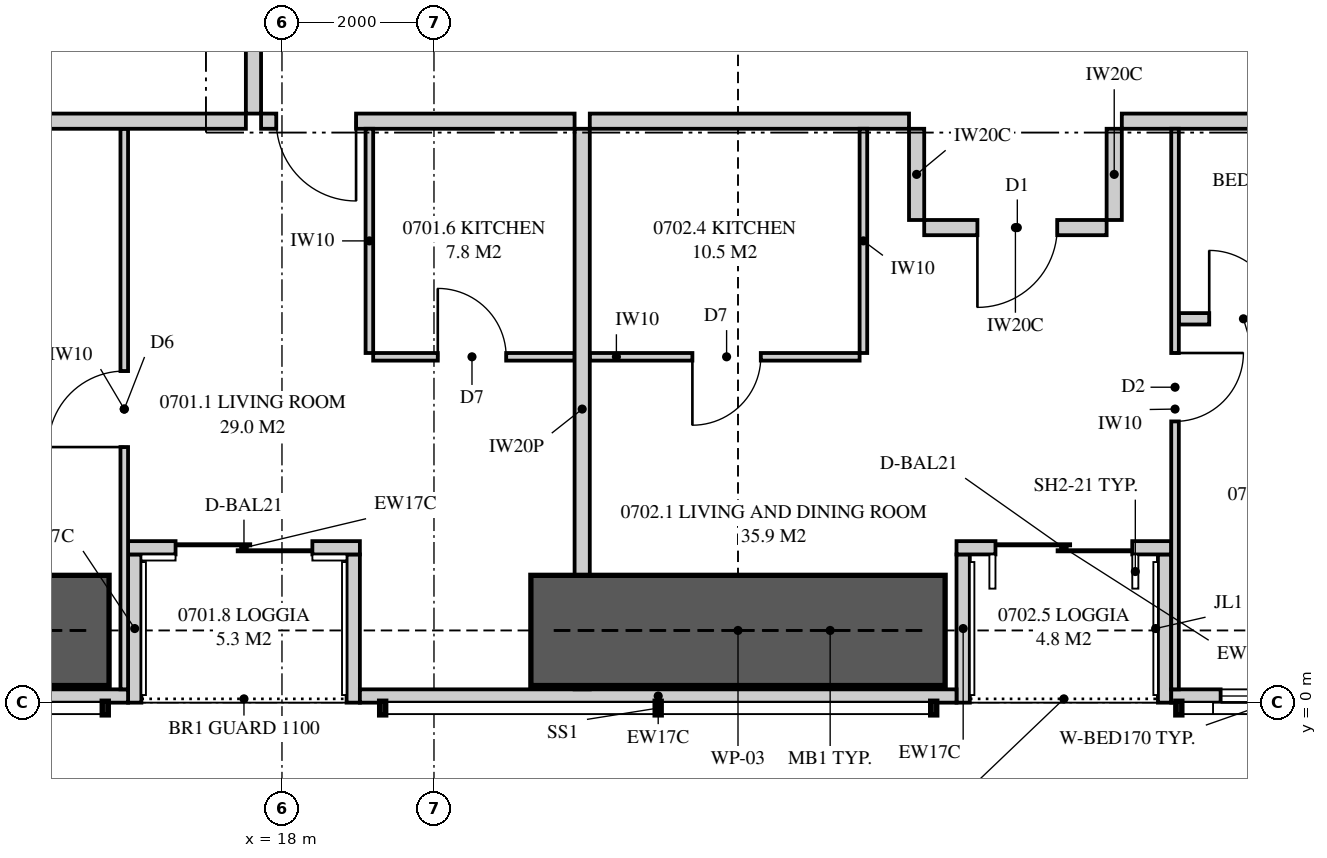
"""IFC4 building model, lengths in metres.
Left out: names, types, materials, properties, quantities, classifications, styles, units other than length and angle.
Written with IfcOpenShell. Run it as: python <this file> out.ifc"""

import sys

from ifc_helpers import new_model, si_unit, direction, frame, frame_2d, origin, place, context, subcontext, project, spatial, polyline, rectangle, outline, extrude, element, fill, save


model = new_model("IFC4")
c1 = context("Model", 3, precision=1e-05, world=origin(), true_north=direction((0.0, 1.0)))
c2 = subcontext(c1, "Body", "Model", "MODEL_VIEW")
j1 = project(units=[si_unit("LENGTHUNIT", "METRE"), si_unit("PLANEANGLEUNIT", "RADIAN")], contexts=[c1])
p1 = place(None, origin())
s1 = spatial("IfcSite", under=j1, at=p1, CompositionType="ELEMENT")
p2 = place(p1, origin())
s2 = spatial("IfcBuilding", under=s1, at=p2, CompositionType="ELEMENT")
p3 = place(p2, frame((0.0, 0.0, 31.05)))
s3 = spatial("IfcBuildingStorey", under=s2, at=p3, CompositionType="ELEMENT", Elevation=31.05)
p4 = place(p3, frame((5.051, 0.087, 0.0), z_axis=(0.0, 0.0, 1.0), x_axis=(1.0, 0.0, 0.0)))
e1 = element("IfcWall", 1, at=p4, inside=s3, PredefinedType="SOLIDWALL", context=c2, shape_type="SweptSolid", body=[
    extrude(outline(polyline([(0.0, 0.0), (10.924, 0.0), (10.924, 2.15), (7.949, 2.15), (7.949, 3.11), (7.793, 3.11), (7.793, 2.15), (7.745, 2.15), (7.745, 3.11), (0.0, 3.11), (0.0, 0.0)])), frame((0.0, 0.087, 0.0), z_axis=(0.0, -1.0, 0.0), x_axis=(1.0, 0.0, 0.0)), (0.0, 0.0, 1.0), 0.175),
])
p5 = place(p4, frame((2.199, 0.0, 0.4)))
e2 = element("IfcOpeningElement", 2, at=p5, cuts=e1, PredefinedType="OPENING", context=c2, shape_type="SweptSolid", body=[
    extrude(rectangle(XDim=1.8, YDim=1.7, at=frame_2d((0.9, 0.85))), frame((0.0, 0.097, 0.0), z_axis=(0.0, -1.0, 0.0), x_axis=(1.0, 0.0, 0.0)), (0.0, 0.0, 1.0), 0.195),
])
p6 = place(p3, frame((19.025, 0.087, 0.0), z_axis=(0.0, 0.0, 1.0), x_axis=(1.0, 0.0, 0.0)))
e3 = element("IfcWall", 3, at=p6, inside=s3, PredefinedType="SOLIDWALL", context=c2, shape_type="SweptSolid", body=[
    extrude(rectangle(XDim=7.85, YDim=0.175, at=frame_2d((3.925, 0.0))), origin(), (0.0, 0.0, 1.0), 2.15),
])
p7 = place(p3, frame((29.7, 0.087, 0.0), z_axis=(0.0, 0.0, 1.0), x_axis=(1.0, 0.0, 0.0)))
e4 = element("IfcWall", 4, at=p7, inside=s3, PredefinedType="SOLIDWALL", context=c2, shape_type="SweptSolid", body=[
    extrude(outline(polyline([(0.0, 0.0), (8.075, 0.0), (8.075, 3.11), (5.504, 3.11), (5.504, 2.15), (5.456, 2.15), (5.456, 3.11), (5.3, 3.11), (5.3, 2.15), (0.0, 2.15), (0.0, 0.0)])), frame((0.0, 0.087, 0.0), z_axis=(0.0, -1.0, 0.0), x_axis=(1.0, 0.0, 0.0)), (0.0, 0.0, 1.0), 0.175),
])
p8 = place(p7, frame((0.65, 0.0, 0.4)))
e5 = element("IfcOpeningElement", 5, at=p8, cuts=e4, PredefinedType="OPENING", context=c2, shape_type="SweptSolid", body=[
    extrude(rectangle(XDim=1.8, YDim=1.7, at=frame_2d((0.9, 0.85))), frame((0.0, 0.097, 0.0), z_axis=(0.0, -1.0, 0.0), x_axis=(1.0, 0.0, 0.0)), (0.0, 0.0, 1.0), 0.195),
])
p9 = place(p3, frame((15.975, 2.038, 0.0), z_axis=(0.0, 0.0, 1.0), x_axis=(1.0, 0.0, 0.0)))
e6 = element("IfcWall", 6, at=p9, inside=s3, PredefinedType="SOLIDWALL", context=c2, shape_type="SweptSolid", body=[
    extrude(rectangle(XDim=3.05, YDim=0.175, at=frame_2d((1.525, 0.0))), origin(), (0.0, 0.0, 1.0), 3.11),
])
p10 = place(p9, frame((0.625, 0.0, 0.0)))
e7 = element("IfcOpeningElement", 7, at=p10, cuts=e6, PredefinedType="OPENING", context=c2, shape_type="SweptSolid", body=[
    extrude(rectangle(XDim=1.8, YDim=2.1, at=frame_2d((0.9, 1.05))), frame((0.0, 0.097, 0.0), z_axis=(0.0, -1.0, 0.0), x_axis=(1.0, 0.0, 0.0)), (0.0, 0.0, 1.0), 0.195),
])
for number, where, z_axis, x_axis in (
    (8, (16.062, 0.0, 0.0), (0.0, 0.0, 1.0), (0.0, 1.0, 0.0)),
    (9, (18.938, 0.0, 0.0), (0.0, 0.0, 1.0), (0.0, 1.0, 0.0)),
):
    element("IfcWall", number, at=place(p3, frame(where, z_axis=z_axis, x_axis=x_axis)), inside=s3, PredefinedType="SOLIDWALL", context=c2, shape_type="SweptSolid", body=[
        extrude(outline(polyline([(0.0, 0.0), (1.95, 0.0), (1.95, 3.11), (1.75, 3.11), (1.75, 2.15), (0.15, 2.15), (0.15, 3.11), (0.0, 3.11), (0.0, 0.0)])), frame((0.0, 0.087, 0.0), z_axis=(0.0, -1.0, 0.0), x_axis=(1.0, 0.0, 0.0)), (0.0, 0.0, 1.0), 0.175),
    ])
p11 = place(p3, frame((26.875, 2.038, 0.0), z_axis=(0.0, 0.0, 1.0), x_axis=(1.0, 0.0, 0.0)))
e10 = element("IfcWall", 10, at=p11, inside=s3, PredefinedType="SOLIDWALL", context=c2, shape_type="SweptSolid", body=[
    extrude(rectangle(XDim=2.825, YDim=0.175, at=frame_2d((1.413, 0.0))), origin(), (0.0, 0.0, 1.0), 3.11),
])
p12 = place(p11, frame((0.512, 0.0, 0.0)))
e11 = element("IfcOpeningElement", 11, at=p12, cuts=e10, PredefinedType="OPENING", context=c2, shape_type="SweptSolid", body=[
    extrude(rectangle(XDim=1.8, YDim=2.1, at=frame_2d((0.9, 1.05))), frame((0.0, 0.097, 0.0), z_axis=(0.0, -1.0, 0.0), x_axis=(1.0, 0.0, 0.0)), (0.0, 0.0, 1.0), 0.195),
])
for number, where, z_axis, x_axis in (
    (12, (26.962, 0.0, 0.0), (0.0, 0.0, 1.0), (0.0, 1.0, 0.0)),
    (13, (29.613, 0.0, 0.0), (0.0, 0.0, 1.0), (0.0, 1.0, 0.0)),
):
    element("IfcWall", number, at=place(p3, frame(where, z_axis=z_axis, x_axis=x_axis)), inside=s3, PredefinedType="SOLIDWALL", context=c2, shape_type="SweptSolid", body=[
        extrude(outline(polyline([(0.0, 0.0), (1.95, 0.0), (1.95, 3.11), (1.75, 3.11), (1.75, 2.15), (0.15, 2.15), (0.15, 3.11), (0.0, 3.11), (0.0, 0.0)])), frame((0.0, 0.087, 0.0), z_axis=(0.0, -1.0, 0.0), x_axis=(1.0, 0.0, 0.0)), (0.0, 0.0, 1.0), 0.175),
    ])
p13 = place(p3, frame((21.95, 0.175, 0.0), z_axis=(0.0, 0.0, 1.0), x_axis=(0.0, 1.0, 0.0)))
e14 = element("IfcWall", 14, at=p13, inside=s3, PredefinedType="PARTITIONING", context=c2, shape_type="SweptSolid", body=[
    extrude(outline(polyline([(0.529, 2.15), (0.0, 2.15), (0.0, 0.0), (0.529, 0.0), (0.529, 0.09), (1.021, 0.09), (1.021, 0.0), (7.375, 0.0), (7.375, 3.11), (1.685, 3.11), (1.685, 2.15), (1.021, 2.15), (1.021, 2.06), (0.529, 2.06), (0.529, 2.15)])), frame((0.0, 0.1, 0.0), z_axis=(0.0, -1.0, 0.0), x_axis=(1.0, 0.0, 0.0)), (0.0, 0.0, 1.0), 0.2),
])
p14 = place(p3, frame((17.725, 7.65, 0.0), z_axis=(0.0, 0.0, 1.0), x_axis=(1.0, 0.0, 0.0)))
e15 = element("IfcWall", 15, at=p14, inside=s3, PredefinedType="PARTITIONING", context=c2, shape_type="SweptSolid", body=[
    extrude(rectangle(XDim=4.125, YDim=0.2, at=frame_2d((2.062, 0.0))), origin(), (0.0, 0.0, 1.0), 3.11),
])
p15 = place(p14, frame((0.2, 0.0, 0.0)))
e16 = element("IfcOpeningElement", 16, at=p15, cuts=e15, PredefinedType="OPENING", context=c2, shape_type="SweptSolid", body=[
    extrude(rectangle(XDim=1.05, YDim=2.2, at=frame_2d((0.525, 1.1))), frame((0.0, 0.11, 0.0), z_axis=(0.0, -1.0, 0.0), x_axis=(1.0, 0.0, 0.0)), (0.0, 0.0, 1.0), 0.22),
])
p16 = place(p3, frame((19.2, 4.55, 0.0), z_axis=(0.0, 0.0, 1.0), x_axis=(1.0, 0.0, 0.0)))
e17 = element("IfcWall", 17, at=p16, inside=s3, PredefinedType="PARTITIONING", context=c2, shape_type="SweptSolid", body=[
    extrude(rectangle(XDim=2.65, YDim=0.1, at=frame_2d((1.325, 0.0))), origin(), (0.0, 0.0, 1.0), 3.11),
])
p17 = place(p16, frame((0.85, 0.0, 0.0)))
e18 = element("IfcOpeningElement", 18, at=p17, cuts=e17, PredefinedType="OPENING", context=c2, shape_type="SweptSolid", body=[
    extrude(rectangle(XDim=0.9, YDim=2.1, at=frame_2d((0.45, 1.05))), frame((0.0, 0.06, 0.0), z_axis=(0.0, -1.0, 0.0), x_axis=(1.0, 0.0, 0.0)), (0.0, 0.0, 1.0), 0.12),
])
p18 = place(p3, frame((19.15, 4.6, 0.0), z_axis=(0.0, 0.0, 1.0), x_axis=(0.0, 1.0, 0.0)))
e19 = element("IfcWall", 19, at=p18, inside=s3, PredefinedType="PARTITIONING", context=c2, shape_type="SweptSolid", body=[
    extrude(rectangle(XDim=2.95, YDim=0.1, at=frame_2d((1.475, 0.0))), origin(), (0.0, 0.0, 1.0), 3.11),
])
p19 = place(p3, frame((15.925, 0.175, 0.0), z_axis=(0.0, 0.0, 1.0), x_axis=(0.0, 1.0, 0.0)))
e20 = element("IfcWall", 20, at=p19, inside=s3, PredefinedType="PARTITIONING", context=c2, shape_type="SweptSolid", body=[
    extrude(outline(polyline([(0.0, 0.0), (7.375, 0.0), (7.375, 3.11), (1.635, 3.11), (1.635, 2.15), (0.0, 2.15), (0.0, 3.11), (0.0, 0.0)])), frame((0.0, 0.05, 0.0), z_axis=(0.0, -1.0, 0.0), x_axis=(1.0, 0.0, 0.0)), (0.0, 0.0, 1.0), 0.1),
])
p20 = place(p19, frame((3.188, 0.0, 0.0)))
e21 = element("IfcOpeningElement", 21, at=p20, cuts=e20, PredefinedType="OPENING", context=c2, shape_type="SweptSolid", body=[
    extrude(rectangle(XDim=1.0, YDim=2.1, at=frame_2d((0.5, 1.05))), frame((0.0, 0.06, 0.0), z_axis=(0.0, -1.0, 0.0), x_axis=(1.0, 0.0, 0.0)), (0.0, 0.0, 1.0), 0.12),
])
p21 = place(p3, frame((22.05, 7.65, 0.0), z_axis=(0.0, 0.0, 1.0), x_axis=(1.0, 0.0, 0.0)))
e22 = element("IfcWall", 22, at=p21, inside=s3, PredefinedType="PARTITIONING", context=c2, shape_type="SweptSolid", body=[
    extrude(outline(polyline([(0.0, 0.0), (4.2, 0.0), (4.2, 3.11), (2.287, 3.11), (2.287, 2.541), (1.613, 2.541), (1.613, 3.11), (0.0, 3.11), (0.0, 0.0)])), frame((0.0, 0.1, 0.0), z_axis=(0.0, -1.0, 0.0), x_axis=(1.0, 0.0, 0.0)), (0.0, 0.0, 1.0), 0.2),
])
p22 = place(p3, frame((29.75, 0.175, 0.0), z_axis=(0.0, 0.0, 1.0), x_axis=(0.0, 1.0, 0.0)))
e23 = element("IfcWall", 23, at=p22, inside=s3, PredefinedType="PARTITIONING", context=c2, shape_type="SweptSolid", body=[
    extrude(outline(polyline([(0.0, 0.0), (7.375, 0.0), (7.375, 3.11), (1.635, 3.11), (1.635, 2.15), (0.0, 2.15), (0.0, 3.11), (0.0, 0.0)])), frame((0.0, 0.05, 0.0), z_axis=(0.0, -1.0, 0.0), x_axis=(1.0, 0.0, 0.0)), (0.0, 0.0, 1.0), 0.1),
])
p23 = place(p22, frame((3.525, 0.0, 0.0)))
e24 = element("IfcOpeningElement", 24, at=p23, cuts=e23, PredefinedType="OPENING", context=c2, shape_type="SweptSolid", body=[
    extrude(rectangle(XDim=0.9, YDim=2.1, at=frame_2d((0.45, 1.05))), frame((0.0, 0.06, 0.0), z_axis=(0.0, -1.0, 0.0), x_axis=(1.0, 0.0, 0.0)), (0.0, 0.0, 1.0), 0.12),
])
p24 = place(p3, frame((29.8, 5.05, 0.0), z_axis=(0.0, 0.0, 1.0), x_axis=(1.0, 0.0, 0.0)))
e25 = element("IfcWall", 25, at=p24, inside=s3, PredefinedType="PLUMBINGWALL", context=c2, shape_type="SweptSolid", body=[
    extrude(rectangle(XDim=3.45, YDim=0.15, at=frame_2d((1.725, 0.0))), origin(), (0.0, 0.0, 1.0), 3.11),
])
p25 = place(p24, frame((0.4, 0.0, 0.0)))
e26 = element("IfcOpeningElement", 26, at=p25, cuts=e25, PredefinedType="OPENING", context=c2, shape_type="SweptSolid", body=[
    extrude(rectangle(XDim=0.9, YDim=2.1, at=frame_2d((0.45, 1.05))), frame((0.0, 0.085, 0.0), z_axis=(0.0, -1.0, 0.0), x_axis=(1.0, 0.0, 0.0)), (0.0, 0.0, 1.0), 0.17),
])
p26 = place(p3, frame((22.05, 4.55, 0.0), z_axis=(0.0, 0.0, 1.0), x_axis=(1.0, 0.0, 0.0)))
e27 = element("IfcWall", 27, at=p26, inside=s3, PredefinedType="PARTITIONING", context=c2, shape_type="SweptSolid", body=[
    extrude(outline(polyline([(0.0, 0.0), (3.55, 0.0), (3.55, 3.11), (2.237, 3.11), (2.237, 2.541), (1.663, 2.541), (1.663, 3.11), (0.0, 3.11), (0.0, 0.0)])), frame((0.0, 0.05, 0.0), z_axis=(0.0, -1.0, 0.0), x_axis=(1.0, 0.0, 0.0)), (0.0, 0.0, 1.0), 0.1),
])
p27 = place(p26, frame((1.35, 0.0, 0.0)))
e28 = element("IfcOpeningElement", 28, at=p27, cuts=e27, PredefinedType="OPENING", context=c2, shape_type="SweptSolid", body=[
    extrude(rectangle(XDim=0.9, YDim=2.1, at=frame_2d((0.45, 1.05))), frame((0.0, 0.06, 0.0), z_axis=(0.0, -1.0, 0.0), x_axis=(1.0, 0.0, 0.0)), (0.0, 0.0, 1.0), 0.12),
])
p28 = place(p3, frame((25.65, 4.6, 0.0), z_axis=(0.0, 0.0, 1.0), x_axis=(0.0, 1.0, 0.0)))
e29 = element("IfcWall", 29, at=p28, inside=s3, PredefinedType="PARTITIONING", context=c2, shape_type="SweptSolid", body=[
    extrude(rectangle(XDim=2.95, YDim=0.1, at=frame_2d((1.475, 0.0))), origin(), (0.0, 0.0, 1.0), 3.11),
])
p29 = place(p3, frame((2.0, 7.65, 0.0), z_axis=(0.0, 0.0, 1.0), x_axis=(1.0, 0.0, 0.0)))
e30 = element("IfcWall", 30, at=p29, inside=s3, PredefinedType="PARTITIONING", context=c2, shape_type="SweptSolid", body=[
    extrude(outline(polyline([(0.0, 0.0), (15.525, 0.0), (15.525, 3.11), (11.337, 3.11), (11.337, 2.541), (10.663, 2.541), (10.663, 3.11), (9.51, 3.11), (9.51, 2.51), (6.89, 2.51), (6.89, 3.11), (2.969, 3.11), (2.969, 2.541), (2.74, 2.541), (2.74, 2.15), (0.896, 2.15), (0.896, 3.11), (0.0, 3.11), (0.0, 0.0)])), frame((0.0, 0.1, 0.0), z_axis=(0.0, -1.0, 0.0), x_axis=(1.0, 0.0, 0.0)), (0.0, 0.0, 1.0), 0.2),
])
p30 = place(p3, frame((17.625, 7.75, 0.0), z_axis=(0.0, 0.0, 1.0), x_axis=(0.0, 1.0, 0.0)))
e31 = element("IfcWall", 31, at=p30, inside=s3, PredefinedType="PARTITIONING", context=c2, shape_type="SweptSolid", body=[
    extrude(outline(polyline([(0.0, 0.0), (9.35, 0.0), (9.35, 3.11), (5.587, 3.11), (5.587, 2.541), (4.913, 2.541), (4.913, 3.11), (0.0, 3.11), (0.0, 0.0)])), frame((0.0, 0.1, 0.0), z_axis=(0.0, -1.0, 0.0), x_axis=(1.0, 0.0, 0.0)), (0.0, 0.0, 1.0), 0.2),
])
p31 = place(p3, frame((29.05, 7.65, 0.0), z_axis=(0.0, 0.0, 1.0), x_axis=(1.0, 0.0, 0.0)))
e32 = element("IfcWall", 32, at=p31, inside=s3, PredefinedType="PARTITIONING", context=c2, shape_type="SweptSolid", body=[
    extrude(rectangle(XDim=4.2, YDim=0.2, at=frame_2d((2.1, 0.0))), origin(), (0.0, 0.0, 1.0), 3.11),
])
p32 = place(p3, frame((26.45, 6.25, 0.0), z_axis=(0.0, 0.0, 1.0), x_axis=(1.0, 0.0, 0.0)))
e33 = element("IfcWall", 33, at=p32, inside=s3, PredefinedType="PARTITIONING", context=c2, shape_type="SweptSolid", body=[
    extrude(rectangle(XDim=2.4, YDim=0.2, at=frame_2d((1.2, 0.0))), origin(), (0.0, 0.0, 1.0), 3.11),
])
p33 = place(p32, frame((0.7, 0.0, 0.0)))
e34 = element("IfcOpeningElement", 34, at=p33, cuts=e33, PredefinedType="OPENING", context=c2, shape_type="SweptSolid", body=[
    extrude(rectangle(XDim=1.05, YDim=2.2, at=frame_2d((0.525, 1.1))), frame((0.0, 0.11, 0.0), z_axis=(0.0, -1.0, 0.0), x_axis=(1.0, 0.0, 0.0)), (0.0, 0.0, 1.0), 0.22),
])
for number, where, z_axis, x_axis in (
    (35, (26.35, 7.55, 0.0), (0.0, 0.0, 1.0), (0.0, -1.0, 0.0)),
    (36, (28.95, 7.55, 0.0), (0.0, 0.0, 1.0), (0.0, -1.0, 0.0)),
):
    element("IfcWall", number, at=place(p3, frame(where, z_axis=z_axis, x_axis=x_axis)), inside=s3, PredefinedType="PARTITIONING", context=c2, shape_type="SweptSolid", body=[
        extrude(rectangle(XDim=1.2, YDim=0.2, at=frame_2d((0.6, 0.0))), origin(), (0.0, 0.0, 1.0), 3.11),
    ])
for number, where, z_axis, x_axis in (
    (37, (10.275, 0.95, 0.0), (0.0, 0.0, 1.0), (1.0, 0.0, 0.0)),
    (38, (21.275, 0.95, 0.0), (0.0, 0.0, 1.0), (1.0, 0.0, 0.0)),
):
    element("IfcWall", number, at=place(p3, frame(where, z_axis=z_axis, x_axis=x_axis)), inside=s3, PredefinedType="SHEAR", context=c2, shape_type="SweptSolid", body=[
        extrude(rectangle(XDim=5.45, YDim=1.45, at=frame_2d((2.725, 0.0))), origin(), (0.0, 0.0, 1.0), 3.35),
    ])
p34 = place(p10, origin())
e39 = element("IfcDoor", 39, at=p34, inside=s3, OperationType="SLIDING_TO_LEFT", PredefinedType="DOOR", context=c2, shape_type="SweptSolid", body=[
    extrude(rectangle(XDim=1.8, YDim=2.1, at=frame_2d((0.9, 1.05))), frame((0.0, 0.025, 0.0), z_axis=(0.0, -1.0, 0.0), x_axis=(1.0, 0.0, 0.0)), (0.0, 0.0, 1.0), 0.05),
])
fill(e7, e39)
p35 = place(p12, origin())
e40 = element("IfcDoor", 40, at=p35, inside=s3, OperationType="SLIDING_TO_LEFT", PredefinedType="DOOR", context=c2, shape_type="SweptSolid", body=[
    extrude(rectangle(XDim=1.8, YDim=2.1, at=frame_2d((0.9, 1.05))), frame((0.0, 0.025, 0.0), z_axis=(0.0, -1.0, 0.0), x_axis=(1.0, 0.0, 0.0)), (0.0, 0.0, 1.0), 0.05),
])
fill(e11, e40)
p36 = place(p8, origin())
e41 = element("IfcWindow", 41, at=p36, inside=s3, PartitioningType="SINGLE_PANEL", PredefinedType="WINDOW", context=c2, shape_type="SweptSolid", body=[
    extrude(rectangle(XDim=1.8, YDim=1.7, at=frame_2d((0.9, 0.85))), frame((0.0, 0.03, 0.0), z_axis=(0.0, -1.0, 0.0), x_axis=(1.0, 0.0, 0.0)), (0.0, 0.0, 1.0), 0.06),
])
fill(e5, e41)
p37 = place(p15, frame((1.05, 0.0, 0.0), z_axis=(0.0, 0.0, 1.0), x_axis=(-1.0, 0.0, 0.0)))
e42 = element("IfcDoor", 42, at=p37, inside=s3, OperationType="SINGLE_SWING_LEFT", PredefinedType="DOOR", context=c2, shape_type="SweptSolid", body=[
    extrude(rectangle(XDim=1.05, YDim=2.2, at=frame_2d((0.525, 1.1))), frame((0.0, 0.025, 0.0), z_axis=(0.0, -1.0, 0.0), x_axis=(1.0, 0.0, 0.0)), (0.0, 0.0, 1.0), 0.05),
])
fill(e16, e42)
p38 = place(p17, origin())
e43 = element("IfcDoor", 43, at=p38, inside=s3, OperationType="SINGLE_SWING_LEFT", PredefinedType="DOOR", context=c2, shape_type="SweptSolid", body=[
    extrude(rectangle(XDim=0.9, YDim=2.1, at=frame_2d((0.45, 1.05))), frame((0.0, 0.025, 0.0), z_axis=(0.0, -1.0, 0.0), x_axis=(1.0, 0.0, 0.0)), (0.0, 0.0, 1.0), 0.05),
])
fill(e18, e43)
p39 = place(p20, origin())
e44 = element("IfcDoor", 44, at=p39, inside=s3, OperationType="SINGLE_SWING_LEFT", PredefinedType="DOOR", context=c2, shape_type="SweptSolid", body=[
    extrude(rectangle(XDim=1.0, YDim=2.1, at=frame_2d((0.5, 1.05))), frame((0.0, 0.025, 0.0), z_axis=(0.0, -1.0, 0.0), x_axis=(1.0, 0.0, 0.0)), (0.0, 0.0, 1.0), 0.05),
])
fill(e21, e44)
p40 = place(p33, frame((1.05, 0.0, 0.0), z_axis=(0.0, 0.0, 1.0), x_axis=(-1.0, 0.0, 0.0)))
e45 = element("IfcDoor", 45, at=p40, inside=s3, OperationType="SINGLE_SWING_RIGHT", PredefinedType="DOOR", context=c2, shape_type="SweptSolid", body=[
    extrude(rectangle(XDim=1.05, YDim=2.2, at=frame_2d((0.525, 1.1))), frame((0.0, 0.025, 0.0), z_axis=(0.0, -1.0, 0.0), x_axis=(1.0, 0.0, 0.0)), (0.0, 0.0, 1.0), 0.05),
])
fill(e34, e45)
p41 = place(p23, frame((0.9, 0.0, 0.0), z_axis=(0.0, 0.0, 1.0), x_axis=(-1.0, 0.0, 0.0)))
e46 = element("IfcDoor", 46, at=p41, inside=s3, OperationType="SINGLE_SWING_LEFT", PredefinedType="DOOR", context=c2, shape_type="SweptSolid", body=[
    extrude(rectangle(XDim=0.9, YDim=2.1, at=frame_2d((0.45, 1.05))), frame((0.0, 0.025, 0.0), z_axis=(0.0, -1.0, 0.0), x_axis=(1.0, 0.0, 0.0)), (0.0, 0.0, 1.0), 0.05),
])
fill(e24, e46)
p42 = place(p25, origin())
e47 = element("IfcDoor", 47, at=p42, inside=s3, OperationType="SINGLE_SWING_LEFT", PredefinedType="DOOR", context=c2, shape_type="SweptSolid", body=[
    extrude(rectangle(XDim=0.9, YDim=2.1, at=frame_2d((0.45, 1.05))), frame((0.0, 0.025, 0.0), z_axis=(0.0, -1.0, 0.0), x_axis=(1.0, 0.0, 0.0)), (0.0, 0.0, 1.0), 0.05),
])
fill(e26, e47)
p43 = place(p27, frame((0.9, 0.0, 0.0), z_axis=(0.0, 0.0, 1.0), x_axis=(-1.0, 0.0, 0.0)))
e48 = element("IfcDoor", 48, at=p43, inside=s3, OperationType="SINGLE_SWING_RIGHT", PredefinedType="DOOR", context=c2, shape_type="SweptSolid", body=[
    extrude(rectangle(XDim=0.9, YDim=2.1, at=frame_2d((0.45, 1.05))), frame((0.0, 0.025, 0.0), z_axis=(0.0, -1.0, 0.0), x_axis=(1.0, 0.0, 0.0)), (0.0, 0.0, 1.0), 0.05),
])
fill(e28, e48)
save(model, sys.argv[1])
